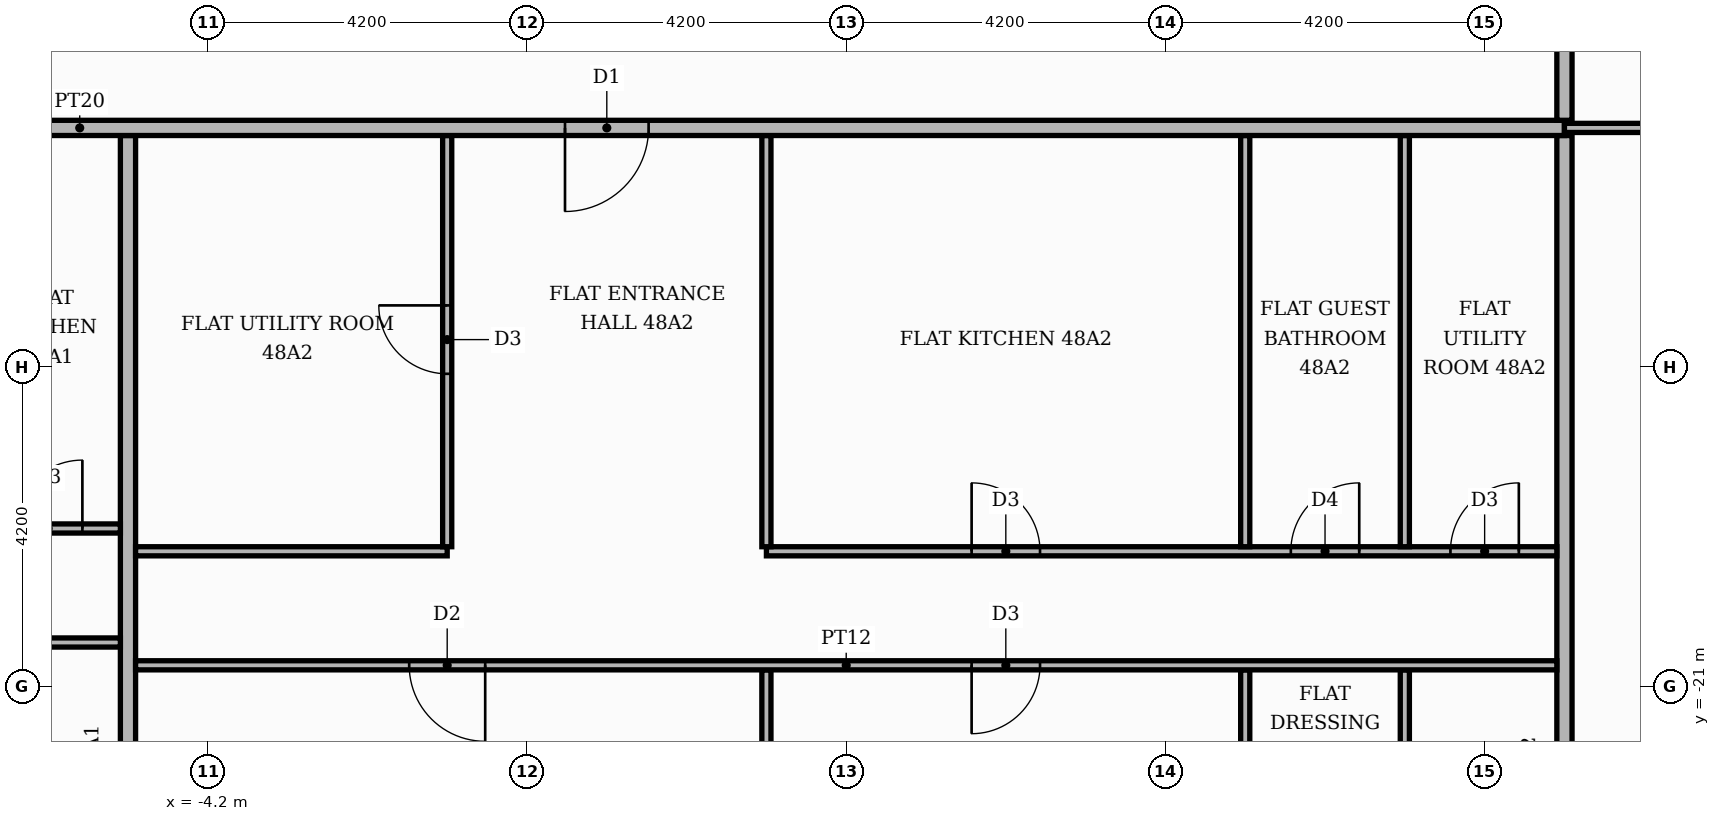
"""IFC4 building model, lengths in metres.
Left out: names, types, materials, properties, quantities, classifications, styles, units other than length and angle.
Written with IfcOpenShell. Run it as: python <this file> out.ifc"""

import sys

from ifc_helpers import new_model, si_unit, direction, frame, frame_2d, origin, place, context, subcontext, project, spatial, rectangle, extrude, element, fill, save


model = new_model("IFC4")
c1 = context("Model", 3, precision=1e-05, world=origin(), true_north=direction((0.0, 1.0)))
c2 = subcontext(c1, "Body", "Model", "MODEL_VIEW")
j1 = project(units=[si_unit("LENGTHUNIT", "METRE"), si_unit("PLANEANGLEUNIT", "RADIAN")], contexts=[c1])
p1 = place(None, origin())
s1 = spatial("IfcSite", under=j1, at=p1, CompositionType="ELEMENT")
p2 = place(p1, origin())
s2 = spatial("IfcBuilding", under=s1, at=p2, CompositionType="ELEMENT")
p3 = place(p2, frame((0.0, 0.0, 204.0)))
s3 = spatial("IfcBuildingStorey", under=s2, at=p3, CompositionType="ELEMENT", Elevation=204.0)
p4 = place(p3, frame((-5.25, -25.42, 0.0), z_axis=(0.0, 0.0, 1.0), x_axis=(0.0, 1.0, 0.0)))
e1 = element("IfcWall", 1, at=p4, inside=s3, PredefinedType="PARTITIONING", context=c2, shape_type="SweptSolid", body=[
    extrude(rectangle(XDim=11.67, YDim=0.2, at=frame_2d((5.835, 0.0))), origin(), (0.0, 0.0, 1.0), 3.48),
])
p5 = place(p3, frame((3.15, -25.42, 0.0), z_axis=(0.0, 0.0, 1.0), x_axis=(0.0, 1.0, 0.0)))
e2 = element("IfcWall", 2, at=p5, inside=s3, PredefinedType="PARTITIONING", context=c2, shape_type="SweptSolid", body=[
    extrude(rectangle(XDim=4.64, YDim=0.12, at=frame_2d((2.32, 0.0))), origin(), (0.0, 0.0, 1.0), 3.48),
])
p6 = place(p3, frame((9.45, -25.42, 0.0), z_axis=(0.0, 0.0, 1.0), x_axis=(0.0, 1.0, 0.0)))
e3 = element("IfcWall", 3, at=p6, inside=s3, PredefinedType="PARTITIONING", context=c2, shape_type="SweptSolid", body=[
    extrude(rectangle(XDim=4.64, YDim=0.12, at=frame_2d((2.32, 0.0))), origin(), (0.0, 0.0, 1.0), 3.48),
])
p7 = place(p6, frame((1.75, 0.0, 0.0)))
e4 = element("IfcOpeningElement", 4, at=p7, cuts=e3, PredefinedType="OPENING", context=c2, shape_type="SweptSolid", body=[
    extrude(rectangle(XDim=0.9, YDim=2.1, at=frame_2d((0.45, 1.05))), frame((0.0, 0.07, 0.0), z_axis=(0.0, -1.0, 0.0), x_axis=(1.0, 0.0, 0.0)), (0.0, 0.0, 1.0), 0.14),
])
p8 = place(p3, frame((11.55, -25.42, 0.0), z_axis=(0.0, 0.0, 1.0), x_axis=(0.0, 1.0, 0.0)))
e5 = element("IfcWall", 5, at=p8, inside=s3, PredefinedType="PARTITIONING", context=c2, shape_type="SweptSolid", body=[
    extrude(rectangle(XDim=4.64, YDim=0.12, at=frame_2d((2.32, 0.0))), origin(), (0.0, 0.0, 1.0), 3.48),
])
p9 = place(p8, frame((1.75, 0.0, 0.0)))
e6 = element("IfcOpeningElement", 6, at=p9, cuts=e5, PredefinedType="OPENING", context=c2, shape_type="SweptSolid", body=[
    extrude(rectangle(XDim=0.9, YDim=2.1, at=frame_2d((0.45, 1.05))), frame((0.0, 0.07, 0.0), z_axis=(0.0, -1.0, 0.0), x_axis=(1.0, 0.0, 0.0)), (0.0, 0.0, 1.0), 0.14),
])
p10 = place(p3, frame((13.65, -25.42, 0.0), z_axis=(0.0, 0.0, 1.0), x_axis=(0.0, 1.0, 0.0)))
e7 = element("IfcWall", 7, at=p10, inside=s3, PredefinedType="PARTITIONING", context=c2, shape_type="SweptSolid", body=[
    extrude(rectangle(XDim=11.67, YDim=0.2, at=frame_2d((5.835, 0.0))), origin(), (0.0, 0.0, 1.0), 3.48),
])
p11 = place(p3, frame((-5.15, -20.72, 0.0), z_axis=(0.0, 0.0, 1.0), x_axis=(1.0, 0.0, 0.0)))
e8 = element("IfcWall", 8, at=p11, inside=s3, PredefinedType="PARTITIONING", context=c2, shape_type="SweptSolid", body=[
    extrude(rectangle(XDim=18.7, YDim=0.12, at=frame_2d((9.35, 0.0))), origin(), (0.0, 0.0, 1.0), 3.48),
])
p12 = place(p11, frame((3.6, 0.0, 0.0)))
e9 = element("IfcOpeningElement", 9, at=p12, cuts=e8, PredefinedType="OPENING", context=c2, shape_type="SweptSolid", body=[
    extrude(rectangle(XDim=1.0, YDim=2.1, at=frame_2d((0.5, 1.05))), frame((0.0, 0.07, 0.0), z_axis=(0.0, -1.0, 0.0), x_axis=(1.0, 0.0, 0.0)), (0.0, 0.0, 1.0), 0.14),
])
p13 = place(p11, frame((11.0, 0.0, 0.0)))
e10 = element("IfcOpeningElement", 10, at=p13, cuts=e8, PredefinedType="OPENING", context=c2, shape_type="SweptSolid", body=[
    extrude(rectangle(XDim=0.9, YDim=2.1, at=frame_2d((0.45, 1.05))), frame((0.0, 0.07, 0.0), z_axis=(0.0, -1.0, 0.0), x_axis=(1.0, 0.0, 0.0)), (0.0, 0.0, 1.0), 0.14),
])
p14 = place(p3, frame((-21.219, -20.42, 0.0), z_axis=(0.0, 0.0, 1.0), x_axis=(1.0, 0.0, 0.0)))
e11 = element("IfcWall", 11, at=p14, inside=s3, PredefinedType="PARTITIONING", context=c2, shape_type="SweptSolid", body=[
    extrude(rectangle(XDim=15.869, YDim=0.12, at=frame_2d((7.935, 0.0))), origin(), (0.0, 0.0, 1.0), 3.48),
])
p15 = place(p14, frame((6.019, 0.0, 0.0)))
e12 = element("IfcOpeningElement", 12, at=p15, cuts=e11, PredefinedType="OPENING", context=c2, shape_type="SweptSolid", body=[
    extrude(rectangle(XDim=1.0, YDim=2.1, at=frame_2d((0.5, 1.05))), frame((0.0, 0.07, 0.0), z_axis=(0.0, -1.0, 0.0), x_axis=(1.0, 0.0, 0.0)), (0.0, 0.0, 1.0), 0.14),
])
p16 = place(p14, frame((9.219, 0.0, 0.0)))
e13 = element("IfcOpeningElement", 13, at=p16, cuts=e11, PredefinedType="OPENING", context=c2, shape_type="SweptSolid", body=[
    extrude(rectangle(XDim=0.9, YDim=2.1, at=frame_2d((0.45, 1.05))), frame((0.0, 0.07, 0.0), z_axis=(0.0, -1.0, 0.0), x_axis=(1.0, 0.0, 0.0)), (0.0, 0.0, 1.0), 0.14),
])
p17 = place(p3, frame((-5.15, -19.22, 0.0), z_axis=(0.0, 0.0, 1.0), x_axis=(1.0, 0.0, 0.0)))
e14 = element("IfcWall", 14, at=p17, inside=s3, PredefinedType="PARTITIONING", context=c2, shape_type="SweptSolid", body=[
    extrude(rectangle(XDim=4.1, YDim=0.12, at=frame_2d((2.05, 0.0))), origin(), (0.0, 0.0, 1.0), 3.48),
])
p18 = place(p3, frame((3.15, -19.22, 0.0), z_axis=(0.0, 0.0, 1.0), x_axis=(1.0, 0.0, 0.0)))
e15 = element("IfcWall", 15, at=p18, inside=s3, PredefinedType="PARTITIONING", context=c2, shape_type="SweptSolid", body=[
    extrude(rectangle(XDim=10.4, YDim=0.12, at=frame_2d((5.2, 0.0))), origin(), (0.0, 0.0, 1.0), 3.48),
])
p19 = place(p18, frame((2.7, 0.0, 0.0)))
e16 = element("IfcOpeningElement", 16, at=p19, cuts=e15, PredefinedType="OPENING", context=c2, shape_type="SweptSolid", body=[
    extrude(rectangle(XDim=0.9, YDim=2.1, at=frame_2d((0.45, 1.05))), frame((0.0, 0.07, 0.0), z_axis=(0.0, -1.0, 0.0), x_axis=(1.0, 0.0, 0.0)), (0.0, 0.0, 1.0), 0.14),
])
p20 = place(p18, frame((6.9, 0.0, 0.0)))
e17 = element("IfcOpeningElement", 17, at=p20, cuts=e15, PredefinedType="OPENING", context=c2, shape_type="SweptSolid", body=[
    extrude(rectangle(XDim=0.9, YDim=2.1, at=frame_2d((0.45, 1.05))), frame((0.0, 0.07, 0.0), z_axis=(0.0, -1.0, 0.0), x_axis=(1.0, 0.0, 0.0)), (0.0, 0.0, 1.0), 0.14),
])
p21 = place(p18, frame((9.0, 0.0, 0.0)))
e18 = element("IfcOpeningElement", 18, at=p21, cuts=e15, PredefinedType="OPENING", context=c2, shape_type="SweptSolid", body=[
    extrude(rectangle(XDim=0.9, YDim=2.1, at=frame_2d((0.45, 1.05))), frame((0.0, 0.07, 0.0), z_axis=(0.0, -1.0, 0.0), x_axis=(1.0, 0.0, 0.0)), (0.0, 0.0, 1.0), 0.14),
])
p22 = place(p3, frame((-1.05, -19.16, 0.0), z_axis=(0.0, 0.0, 1.0), x_axis=(0.0, 1.0, 0.0)))
e19 = element("IfcWall", 19, at=p22, inside=s3, PredefinedType="PARTITIONING", context=c2, shape_type="SweptSolid", body=[
    extrude(rectangle(XDim=5.41, YDim=0.12, at=frame_2d((2.705, 0.0))), origin(), (0.0, 0.0, 1.0), 3.48),
])
p23 = place(p22, frame((2.275, 0.0, 0.0)))
e20 = element("IfcOpeningElement", 20, at=p23, cuts=e19, PredefinedType="OPENING", context=c2, shape_type="SweptSolid", body=[
    extrude(rectangle(XDim=0.9, YDim=2.1, at=frame_2d((0.45, 1.05))), frame((0.0, 0.07, 0.0), z_axis=(0.0, -1.0, 0.0), x_axis=(1.0, 0.0, 0.0)), (0.0, 0.0, 1.0), 0.14),
])
for number, where, z_axis, x_axis in (
    (21, (3.15, -19.16, 0.0), (0.0, 0.0, 1.0), (0.0, 1.0, 0.0)),
    (22, (9.45, -19.16, 0.0), (0.0, 0.0, 1.0), (0.0, 1.0, 0.0)),
    (23, (11.55, -19.16, 0.0), (0.0, 0.0, 1.0), (0.0, 1.0, 0.0)),
):
    element("IfcWall", number, at=place(p3, frame(where, z_axis=z_axis, x_axis=x_axis)), inside=s3, PredefinedType="PARTITIONING", context=c2, shape_type="SweptSolid", body=[
        extrude(rectangle(XDim=5.41, YDim=0.12, at=frame_2d((2.705, 0.0))), origin(), (0.0, 0.0, 1.0), 3.48),
    ])
p24 = place(p3, frame((-9.45, -18.92, 0.0), z_axis=(0.0, 0.0, 1.0), x_axis=(1.0, 0.0, 0.0)))
e24 = element("IfcWall", 24, at=p24, inside=s3, PredefinedType="PARTITIONING", context=c2, shape_type="SweptSolid", body=[
    extrude(rectangle(XDim=4.1, YDim=0.12, at=frame_2d((2.05, 0.0))), origin(), (0.0, 0.0, 1.0), 3.48),
])
p25 = place(p24, frame((2.7, 0.0, 0.0)))
e25 = element("IfcOpeningElement", 25, at=p25, cuts=e24, PredefinedType="OPENING", context=c2, shape_type="SweptSolid", body=[
    extrude(rectangle(XDim=0.9, YDim=2.1, at=frame_2d((0.45, 1.05))), frame((0.0, 0.07, 0.0), z_axis=(0.0, -1.0, 0.0), x_axis=(1.0, 0.0, 0.0)), (0.0, 0.0, 1.0), 0.14),
])
p26 = place(p3, frame((-25.42, -13.65, 0.0), z_axis=(0.0, 0.0, 1.0), x_axis=(1.0, 0.0, 0.0)))
e26 = element("IfcWall", 26, at=p26, inside=s3, PredefinedType="PARTITIONING", context=c2, shape_type="SweptSolid", body=[
    extrude(rectangle(XDim=39.07, YDim=0.2, at=frame_2d((19.535, 0.0))), origin(), (0.0, 0.0, 1.0), 3.48),
])
p27 = place(p26, frame((13.32, 0.0, 0.0)))
e27 = element("IfcOpeningElement", 27, at=p27, cuts=e26, PredefinedType="OPENING", context=c2, shape_type="SweptSolid", body=[
    extrude(rectangle(XDim=1.1, YDim=2.4, at=frame_2d((0.55, 1.2))), frame((0.0, 0.11, 0.0), z_axis=(0.0, -1.0, 0.0), x_axis=(1.0, 0.0, 0.0)), (0.0, 0.0, 1.0), 0.22),
])
p28 = place(p26, frame((25.92, 0.0, 0.0)))
e28 = element("IfcOpeningElement", 28, at=p28, cuts=e26, PredefinedType="OPENING", context=c2, shape_type="SweptSolid", body=[
    extrude(rectangle(XDim=1.1, YDim=2.4, at=frame_2d((0.55, 1.2))), frame((0.0, 0.11, 0.0), z_axis=(0.0, -1.0, 0.0), x_axis=(1.0, 0.0, 0.0)), (0.0, 0.0, 1.0), 0.22),
])
p29 = place(p3, frame((13.65, -13.65, 0.0), z_axis=(0.0, 0.0, 1.0), x_axis=(1.0, 0.0, 0.0)))
e29 = element("IfcWall", 29, at=p29, inside=s3, PredefinedType="PARTITIONING", context=c2, shape_type="SweptSolid", body=[
    extrude(rectangle(XDim=6.47, YDim=0.12, at=frame_2d((3.235, 0.0))), origin(), (0.0, 0.0, 1.0), 3.48),
])
p30 = place(p29, frame((2.785, 0.0, 0.0)))
e30 = element("IfcOpeningElement", 30, at=p30, cuts=e29, PredefinedType="OPENING", context=c2, shape_type="SweptSolid", body=[
    extrude(rectangle(XDim=0.9, YDim=2.1, at=frame_2d((0.45, 1.05))), frame((0.0, 0.07, 0.0), z_axis=(0.0, -1.0, 0.0), x_axis=(1.0, 0.0, 0.0)), (0.0, 0.0, 1.0), 0.14),
])
p31 = place(p3, frame((13.65, -13.55, 0.0), z_axis=(0.0, 0.0, 1.0), x_axis=(0.0, 1.0, 0.0)))
e31 = element("IfcWall", 31, at=p31, inside=s3, PredefinedType="PARTITIONING", context=c2, shape_type="SweptSolid", body=[
    extrude(rectangle(XDim=2.45, YDim=0.2, at=frame_2d((1.225, 0.0))), origin(), (0.0, 0.0, 1.0), 3.48),
])
p32 = place(p25, origin())
e32 = element("IfcDoor", 32, at=p32, inside=s3, OperationType="SINGLE_SWING_RIGHT", PredefinedType="DOOR", context=c2, shape_type="SweptSolid", body=[
    extrude(rectangle(XDim=0.9, YDim=2.1, at=frame_2d((0.45, 1.05))), frame((0.0, 0.025, 0.0), z_axis=(0.0, -1.0, 0.0), x_axis=(1.0, 0.0, 0.0)), (0.0, 0.0, 1.0), 0.05),
])
fill(e25, e32)
p33 = place(p28, frame((1.1, 0.0, 0.0), z_axis=(0.0, 0.0, 1.0), x_axis=(-1.0, 0.0, 0.0)))
e33 = element("IfcDoor", 33, at=p33, inside=s3, OperationType="SINGLE_SWING_LEFT", PredefinedType="DOOR", context=c2, shape_type="SweptSolid", body=[
    extrude(rectangle(XDim=1.1, YDim=2.4, at=frame_2d((0.55, 1.2))), frame((0.0, 0.025, 0.0), z_axis=(0.0, -1.0, 0.0), x_axis=(1.0, 0.0, 0.0)), (0.0, 0.0, 1.0), 0.05),
])
fill(e28, e33)
p34 = place(p23, origin())
e34 = element("IfcDoor", 34, at=p34, inside=s3, OperationType="SINGLE_SWING_RIGHT", PredefinedType="DOOR", context=c2, shape_type="SweptSolid", body=[
    extrude(rectangle(XDim=0.9, YDim=2.1, at=frame_2d((0.45, 1.05))), frame((0.0, 0.025, 0.0), z_axis=(0.0, -1.0, 0.0), x_axis=(1.0, 0.0, 0.0)), (0.0, 0.0, 1.0), 0.05),
])
fill(e20, e34)
p35 = place(p19, origin())
e35 = element("IfcDoor", 35, at=p35, inside=s3, OperationType="SINGLE_SWING_LEFT", PredefinedType="DOOR", context=c2, shape_type="SweptSolid", body=[
    extrude(rectangle(XDim=0.9, YDim=2.1, at=frame_2d((0.45, 1.05))), frame((0.0, 0.025, 0.0), z_axis=(0.0, -1.0, 0.0), x_axis=(1.0, 0.0, 0.0)), (0.0, 0.0, 1.0), 0.05),
])
fill(e16, e35)
p36 = place(p20, origin())
e36 = element("IfcDoor", 36, at=p36, inside=s3, OperationType="SINGLE_SWING_RIGHT", PredefinedType="DOOR", context=c2, shape_type="SweptSolid", body=[
    extrude(rectangle(XDim=0.9, YDim=2.1, at=frame_2d((0.45, 1.05))), frame((0.0, 0.025, 0.0), z_axis=(0.0, -1.0, 0.0), x_axis=(1.0, 0.0, 0.0)), (0.0, 0.0, 1.0), 0.05),
])
fill(e17, e36)
p37 = place(p21, origin())
e37 = element("IfcDoor", 37, at=p37, inside=s3, OperationType="SINGLE_SWING_RIGHT", PredefinedType="DOOR", context=c2, shape_type="SweptSolid", body=[
    extrude(rectangle(XDim=0.9, YDim=2.1, at=frame_2d((0.45, 1.05))), frame((0.0, 0.025, 0.0), z_axis=(0.0, -1.0, 0.0), x_axis=(1.0, 0.0, 0.0)), (0.0, 0.0, 1.0), 0.05),
])
fill(e18, e37)
p38 = place(p12, frame((1.0, 0.0, 0.0), z_axis=(0.0, 0.0, 1.0), x_axis=(-1.0, 0.0, 0.0)))
e38 = element("IfcDoor", 38, at=p38, inside=s3, OperationType="SINGLE_SWING_RIGHT", PredefinedType="DOOR", context=c2, shape_type="SweptSolid", body=[
    extrude(rectangle(XDim=1.0, YDim=2.1, at=frame_2d((0.5, 1.05))), frame((0.0, 0.025, 0.0), z_axis=(0.0, -1.0, 0.0), x_axis=(1.0, 0.0, 0.0)), (0.0, 0.0, 1.0), 0.05),
])
fill(e9, e38)
p39 = place(p13, frame((0.9, 0.0, 0.0), z_axis=(0.0, 0.0, 1.0), x_axis=(-1.0, 0.0, 0.0)))
e39 = element("IfcDoor", 39, at=p39, inside=s3, OperationType="SINGLE_SWING_LEFT", PredefinedType="DOOR", context=c2, shape_type="SweptSolid", body=[
    extrude(rectangle(XDim=0.9, YDim=2.1, at=frame_2d((0.45, 1.05))), frame((0.0, 0.025, 0.0), z_axis=(0.0, -1.0, 0.0), x_axis=(1.0, 0.0, 0.0)), (0.0, 0.0, 1.0), 0.05),
])
fill(e10, e39)
save(model, sys.argv[1])
